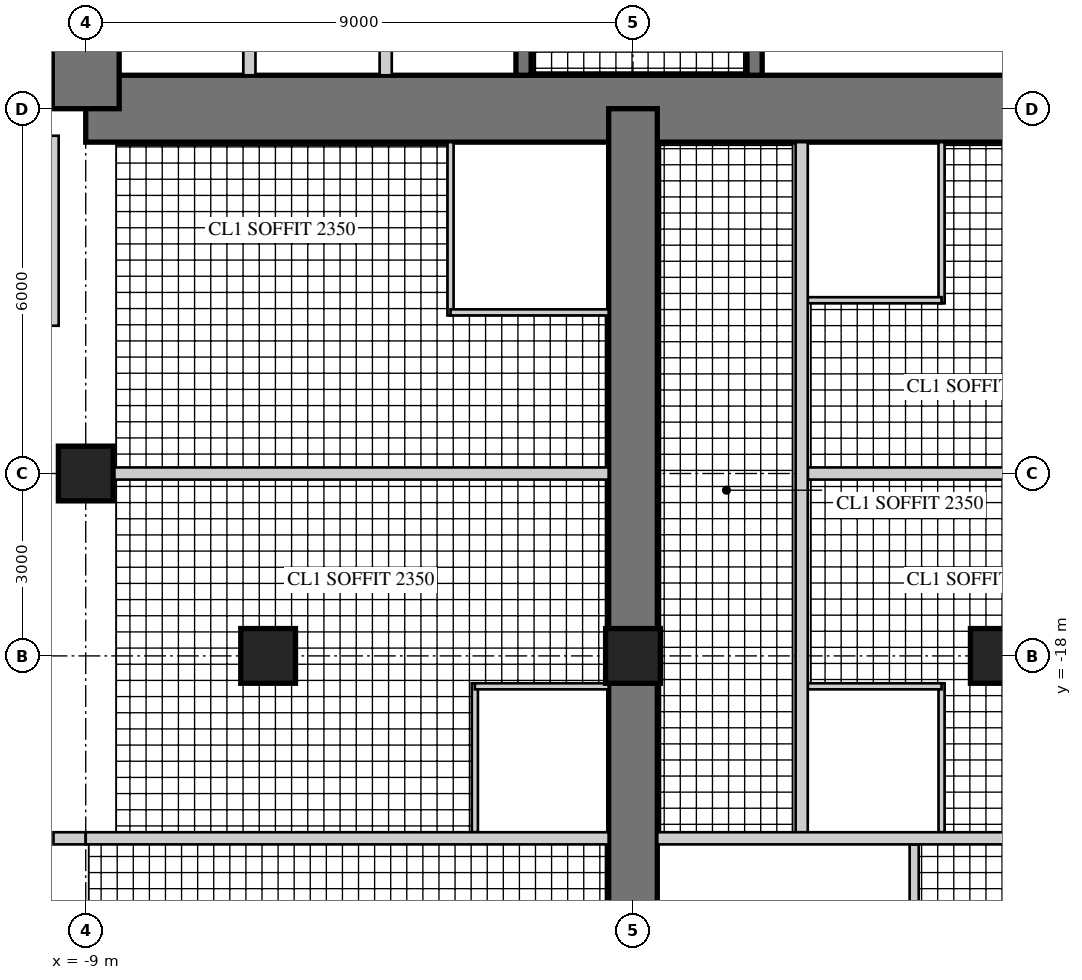
"""IFC4 building model, lengths in metres.
Left out: names, types, materials, properties, quantities, classifications, styles, units other than length and angle.
Written with IfcOpenShell. Run it as: python <this file> out.ifc"""

import sys

from ifc_helpers import new_model, si_unit, direction, frame, frame_2d, origin, origin_2d, place, context, subcontext, project, spatial, rectangle, hollow_rectangle, extrude, element, fill, save


model = new_model("IFC4")
c1 = context("Model", 3, precision=1e-05, world=origin(), true_north=direction((0.0, 1.0)))
c2 = subcontext(c1, "Body", "Model", "MODEL_VIEW")
j1 = project(units=[si_unit("LENGTHUNIT", "METRE"), si_unit("PLANEANGLEUNIT", "RADIAN")], contexts=[c1])
p1 = place(None, origin())
s1 = spatial("IfcSite", under=j1, at=p1, CompositionType="ELEMENT")
p2 = place(p1, origin())
s2 = spatial("IfcBuilding", under=s1, at=p2, CompositionType="ELEMENT")
p3 = place(p2, frame((0.0, 0.0, 172.9)))
s3 = spatial("IfcBuildingStorey", under=s2, at=p3, CompositionType="ELEMENT", Elevation=172.9)
p4 = place(p3, frame((-9.0, -9.0, 0.0), z_axis=(0.0, 0.0, 1.0), x_axis=(1.0, 0.0, 0.0)))
e1 = element("IfcWall", 1, at=p4, inside=s3, PredefinedType="SHEAR", context=c2, shape_type="SweptSolid", body=[
    extrude(rectangle(XDim=18.0, YDim=1.1, at=frame_2d((9.0, 0.0))), origin(), (0.0, 0.0, 1.0), 3.4),
])
p5 = place(p4, frame((9.8, 0.0, 0.0)))
e2 = element("IfcOpeningElement", 2, at=p5, cuts=e1, PredefinedType="OPENING", context=c2, shape_type="SweptSolid", body=[
    extrude(rectangle(XDim=1.0, YDim=2.4, at=frame_2d((0.5, 1.2))), frame((0.0, 0.56, 0.0), z_axis=(0.0, -1.0, 0.0), x_axis=(1.0, 0.0, 0.0)), (0.0, 0.0, 1.0), 1.12),
])
p6 = place(p3, frame((-9.0, 9.0, 0.0), z_axis=(0.0, 0.0, 1.0), x_axis=(0.0, -1.0, 0.0)))
e3 = element("IfcWall", 3, at=p6, inside=s3, PredefinedType="SHEAR", context=c2, shape_type="SweptSolid", body=[
    extrude(rectangle(XDim=18.0, YDim=1.1, at=frame_2d((9.0, 0.0))), origin(), (0.0, 0.0, 1.0), 3.4),
])
p7 = place(p6, frame((9.8, 0.0, 0.0)))
e4 = element("IfcOpeningElement", 4, at=p7, cuts=e3, PredefinedType="OPENING", context=c2, shape_type="SweptSolid", body=[
    extrude(rectangle(XDim=1.0, YDim=2.4, at=frame_2d((0.5, 1.2))), frame((0.0, 0.56, 0.0), z_axis=(0.0, -1.0, 0.0), x_axis=(1.0, 0.0, 0.0)), (0.0, 0.0, 1.0), 1.12),
])
p8 = place(p3, frame((-1.8, -1.875, 0.0), z_axis=(0.0, 0.0, 1.0), x_axis=(0.0, -1.0, 0.0)))
e5 = element("IfcWall", 5, at=p8, inside=s3, PredefinedType="SHEAR", context=c2, shape_type="SweptSolid", body=[
    extrude(rectangle(XDim=6.575, YDim=0.25, at=frame_2d((3.288, 0.0))), origin(), (0.0, 0.0, 1.0), 3.4),
])
p9 = place(p8, frame((1.875, 0.0, 0.0)))
e6 = element("IfcOpeningElement", 6, at=p9, cuts=e5, PredefinedType="OPENING", context=c2, shape_type="SweptSolid", body=[
    extrude(rectangle(XDim=1.6, YDim=2.4, at=frame_2d((0.8, 1.2))), frame((0.0, 0.135, 0.0), z_axis=(0.0, -1.0, 0.0), x_axis=(1.0, 0.0, 0.0)), (0.0, 0.0, 1.0), 0.27),
])
for number, where, z_axis, x_axis in (
    (7, (-4.067, -5.975, 0.0), (0.0, 0.0, 1.0), (0.0, -1.0, 0.0)),
    (8, (-6.308, -5.975, 0.0), (0.0, 0.0, 1.0), (0.0, -1.0, 0.0)),
):
    element("IfcWall", number, at=place(p3, frame(where, z_axis=z_axis, x_axis=x_axis)), inside=s3, PredefinedType="PARTITIONING", context=c2, shape_type="SweptSolid", body=[
        extrude(rectangle(XDim=2.475, YDim=0.2, at=frame_2d((1.237, 0.0))), origin(), (0.0, 0.0, 1.0), 3.4),
    ])
p10 = place(p3, frame((2.0, -1.675, 0.0), z_axis=(0.0, 0.0, 1.0), x_axis=(0.0, -1.0, 0.0)))
e9 = element("IfcWall", 9, at=p10, inside=s3, PredefinedType="SHEAR", context=c2, shape_type="SweptSolid", body=[
    extrude(rectangle(XDim=6.775, YDim=0.25, at=frame_2d((3.387, 0.0))), origin(), (0.0, 0.0, 1.0), 3.4),
])
p11 = place(p10, frame((0.725, 0.0, 0.0)))
e10 = element("IfcOpeningElement", 10, at=p11, cuts=e9, PredefinedType="OPENING", context=c2, shape_type="SweptSolid", body=[
    extrude(rectangle(XDim=1.0, YDim=2.1, at=frame_2d((0.5, 1.05))), frame((0.0, 0.135, 0.0), z_axis=(0.0, -1.0, 0.0), x_axis=(1.0, 0.0, 0.0)), (0.0, 0.0, 1.0), 0.27),
])
p12 = place(p3, frame((0.0, -9.0, 0.0), z_axis=(0.0, 0.0, 1.0), x_axis=(0.0, -1.0, 0.0)))
e11 = element("IfcWall", 11, at=p12, inside=s3, PredefinedType="SHEAR", context=c2, shape_type="SweptSolid", body=[
    extrude(rectangle(XDim=18.0, YDim=0.8, at=frame_2d((9.0, 0.0))), origin(), (0.0, 0.0, 1.0), 3.4),
])
p13 = place(p12, frame((3.95, 0.0, 0.0)))
e12 = element("IfcOpeningElement", 12, at=p13, cuts=e11, PredefinedType="OPENING", context=c2, shape_type="SweptSolid", body=[
    extrude(rectangle(XDim=1.0, YDim=2.15, at=frame_2d((0.5, 1.075))), frame((0.0, 0.41, 0.0), z_axis=(0.0, -1.0, 0.0), x_axis=(1.0, 0.0, 0.0)), (0.0, 0.0, 1.0), 0.82),
])
p14 = place(p12, frame((6.6, 0.0, 0.0)))
e13 = element("IfcOpeningElement", 13, at=p14, cuts=e11, PredefinedType="OPENING", context=c2, shape_type="SweptSolid", body=[
    extrude(rectangle(XDim=1.0, YDim=2.15, at=frame_2d((0.5, 1.075))), frame((0.0, 0.41, 0.0), z_axis=(0.0, -1.0, 0.0), x_axis=(1.0, 0.0, 0.0)), (0.0, 0.0, 1.0), 0.82),
])
p15 = place(p12, frame((13.25, 0.0, 0.0)))
e14 = element("IfcOpeningElement", 14, at=p15, cuts=e11, PredefinedType="OPENING", context=c2, shape_type="SweptSolid", body=[
    extrude(rectangle(XDim=1.0, YDim=2.2, at=frame_2d((0.5, 1.1))), frame((0.0, 0.41, 0.0), z_axis=(0.0, -1.0, 0.0), x_axis=(1.0, 0.0, 0.0)), (0.0, 0.0, 1.0), 0.82),
])
for number, where, z_axis, x_axis in (
    (15, (-9.0, -15.0, 0.0), (0.0, 0.0, 1.0), (1.0, 0.0, 0.0)),
    (16, (-6.0, -18.0, 0.0), (0.0, 0.0, 1.0), (1.0, 0.0, 0.0)),
    (17, (0.0, -18.0, 0.0), (0.0, 0.0, 1.0), (1.0, 0.0, 0.0)),
    (18, (6.0, -18.0, 0.0), (0.0, 0.0, 1.0), (1.0, 0.0, 0.0)),
):
    element("IfcColumn", number, at=place(p3, frame(where, z_axis=z_axis, x_axis=x_axis)), inside=s3, PredefinedType="COLUMN", context=c2, shape_type="SweptSolid", body=[
        extrude(rectangle(XDim=0.9, YDim=0.9, at=origin_2d()), origin(), (0.0, 0.0, 1.0), 3.4),
    ])
p16 = place(p3, frame((-9.57, -9.445, 0.0), z_axis=(0.0, 0.0, 1.0), x_axis=(0.0, -1.0, 0.0)))
e19 = element("IfcWall", 19, at=p16, inside=s3, PredefinedType="SOLIDWALL", context=c2, shape_type="SweptSolid", body=[
    extrude(rectangle(XDim=3.125, YDim=0.25, at=frame_2d((1.562, 0.0))), origin(), (0.0, 0.0, 1.0), 3.22),
])
p17 = place(p16, frame((0.6, 0.0, 0.0)))
e20 = element("IfcOpeningElement", 20, at=p17, cuts=e19, PredefinedType="OPENING", context=c2, shape_type="SweptSolid", body=[
    extrude(rectangle(XDim=1.0, YDim=2.2, at=frame_2d((0.5, 1.1))), frame((0.0, 0.135, 0.0), z_axis=(0.0, -1.0, 0.0), x_axis=(1.0, 0.0, 0.0)), (0.0, 0.0, 1.0), 0.27),
])
p18 = place(p3, frame((5.075, -9.55, 0.0), z_axis=(0.0, 0.0, 1.0), x_axis=(0.0, -1.0, 0.0)))
e21 = element("IfcWall", 21, at=p18, inside=s3, PredefinedType="PARTITIONING", context=c2, shape_type="SweptSolid", body=[
    extrude(rectangle(XDim=2.65, YDim=0.1, at=frame_2d((1.325, 0.0))), origin(), (0.0, 0.0, 1.0), 3.22),
])
p19 = place(p3, frame((2.875, -12.15, 0.0), z_axis=(0.0, 0.0, 1.0), x_axis=(1.0, 0.0, 0.0)))
e22 = element("IfcWall", 22, at=p19, inside=s3, PredefinedType="PARTITIONING", context=c2, shape_type="SweptSolid", body=[
    extrude(rectangle(XDim=2.2, YDim=0.1, at=frame_2d((1.1, 0.0))), origin(), (0.0, 0.0, 1.0), 3.22),
])
p20 = place(p19, frame((0.55, 0.0, 0.0)))
e23 = element("IfcOpeningElement", 23, at=p20, cuts=e22, PredefinedType="OPENING", context=c2, shape_type="SweptSolid", body=[
    extrude(rectangle(XDim=0.9, YDim=2.1, at=frame_2d((0.45, 1.05))), frame((0.0, 0.06, 0.0), z_axis=(0.0, -1.0, 0.0), x_axis=(1.0, 0.0, 0.0)), (0.0, 0.0, 1.0), 0.12),
])
p21 = place(p3, frame((-3.0, -9.55, 0.0), z_axis=(0.0, 0.0, 1.0), x_axis=(0.0, -1.0, 0.0)))
e24 = element("IfcWall", 24, at=p21, inside=s3, PredefinedType="PARTITIONING", context=c2, shape_type="SweptSolid", body=[
    extrude(rectangle(XDim=2.85, YDim=0.1, at=frame_2d((1.425, 0.0))), origin(), (0.0, 0.0, 1.0), 3.22),
])
p22 = place(p3, frame((-3.0, -12.35, 0.0), z_axis=(0.0, 0.0, 1.0), x_axis=(1.0, 0.0, 0.0)))
e25 = element("IfcWall", 25, at=p22, inside=s3, PredefinedType="PARTITIONING", context=c2, shape_type="SweptSolid", body=[
    extrude(rectangle(XDim=2.6, YDim=0.1, at=frame_2d((1.3, 0.0))), origin(), (0.0, 0.0, 1.0), 3.22),
])
p23 = place(p22, frame((0.55, 0.0, 0.0)))
e26 = element("IfcOpeningElement", 26, at=p23, cuts=e25, PredefinedType="OPENING", context=c2, shape_type="SweptSolid", body=[
    extrude(rectangle(XDim=0.9, YDim=2.1, at=frame_2d((0.45, 1.05))), frame((0.0, 0.06, 0.0), z_axis=(0.0, -1.0, 0.0), x_axis=(1.0, 0.0, 0.0)), (0.0, 0.0, 1.0), 0.12),
])
p24 = place(p3, frame((2.875, -15.0, 0.0), z_axis=(0.0, 0.0, 1.0), x_axis=(1.0, 0.0, 0.0)))
e27 = element("IfcWall", 27, at=p24, inside=s3, PredefinedType="SOLIDWALL", context=c2, shape_type="SweptSolid", body=[
    extrude(rectangle(XDim=5.675, YDim=0.2, at=frame_2d((2.837, 0.0))), origin(), (0.0, 0.0, 1.0), 2.47),
])
p25 = place(p3, frame((-8.55, -15.0, 0.0), z_axis=(0.0, 0.0, 1.0), x_axis=(1.0, 0.0, 0.0)))
e28 = element("IfcWall", 28, at=p25, inside=s3, PredefinedType="SOLIDWALL", context=c2, shape_type="SweptSolid", body=[
    extrude(rectangle(XDim=8.15, YDim=0.2, at=frame_2d((4.075, 0.0))), origin(), (0.0, 0.0, 1.0), 2.47),
])
p26 = place(p3, frame((5.075, -18.45, 0.0), z_axis=(0.0, 0.0, 1.0), x_axis=(0.0, -1.0, 0.0)))
e29 = element("IfcWall", 29, at=p26, inside=s3, PredefinedType="PARTITIONING", context=c2, shape_type="SweptSolid", body=[
    extrude(rectangle(XDim=2.45, YDim=0.1, at=frame_2d((1.225, 0.0))), origin(), (0.0, 0.0, 1.0), 3.22),
])
p27 = place(p3, frame((2.875, -18.5, 0.0), z_axis=(0.0, 0.0, 1.0), x_axis=(1.0, 0.0, 0.0)))
e30 = element("IfcWall", 30, at=p27, inside=s3, PredefinedType="PARTITIONING", context=c2, shape_type="SweptSolid", body=[
    extrude(rectangle(XDim=2.2, YDim=0.1, at=frame_2d((1.1, 0.0))), origin(), (0.0, 0.0, 1.0), 3.22),
])
p28 = place(p27, frame((0.55, 0.0, 0.0)))
e31 = element("IfcOpeningElement", 31, at=p28, cuts=e30, PredefinedType="OPENING", context=c2, shape_type="SweptSolid", body=[
    extrude(rectangle(XDim=0.9, YDim=2.1, at=frame_2d((0.45, 1.05))), frame((0.0, 0.06, 0.0), z_axis=(0.0, -1.0, 0.0), x_axis=(1.0, 0.0, 0.0)), (0.0, 0.0, 1.0), 0.12),
])
p29 = place(p3, frame((-2.6, -18.45, 0.0), z_axis=(0.0, 0.0, 1.0), x_axis=(0.0, -1.0, 0.0)))
e32 = element("IfcWall", 32, at=p29, inside=s3, PredefinedType="PARTITIONING", context=c2, shape_type="SweptSolid", body=[
    extrude(rectangle(XDim=2.45, YDim=0.1, at=frame_2d((1.225, 0.0))), origin(), (0.0, 0.0, 1.0), 3.22),
])
p30 = place(p3, frame((-2.6, -18.5, 0.0), z_axis=(0.0, 0.0, 1.0), x_axis=(1.0, 0.0, 0.0)))
e33 = element("IfcWall", 33, at=p30, inside=s3, PredefinedType="PARTITIONING", context=c2, shape_type="SweptSolid", body=[
    extrude(rectangle(XDim=2.2, YDim=0.1, at=frame_2d((1.1, 0.0))), origin(), (0.0, 0.0, 1.0), 3.22),
])
p31 = place(p30, frame((0.55, 0.0, 0.0)))
e34 = element("IfcOpeningElement", 34, at=p31, cuts=e33, PredefinedType="OPENING", context=c2, shape_type="SweptSolid", body=[
    extrude(rectangle(XDim=0.9, YDim=2.1, at=frame_2d((0.45, 1.05))), frame((0.0, 0.06, 0.0), z_axis=(0.0, -1.0, 0.0), x_axis=(1.0, 0.0, 0.0)), (0.0, 0.0, 1.0), 0.12),
])
p32 = place(p3, frame((2.775, -9.55, 0.0), z_axis=(0.0, 0.0, 1.0), x_axis=(0.0, -1.0, 0.0)))
e35 = element("IfcWall", 35, at=p32, inside=s3, PredefinedType="SOLIDWALL", context=c2, shape_type="SweptSolid", body=[
    extrude(rectangle(XDim=11.45, YDim=0.2, at=frame_2d((5.725, 0.0))), origin(), (0.0, 0.0, 1.0), 3.22),
])
p33 = place(p32, frame((3.4, 0.0, 0.0)))
e36 = element("IfcOpeningElement", 36, at=p33, cuts=e35, PredefinedType="OPENING", context=c2, shape_type="SweptSolid", body=[
    extrude(rectangle(XDim=1.0, YDim=2.15, at=frame_2d((0.5, 1.075))), frame((0.0, 0.11, 0.0), z_axis=(0.0, -1.0, 0.0), x_axis=(1.0, 0.0, 0.0)), (0.0, 0.0, 1.0), 0.22),
])
p34 = place(p32, frame((6.05, 0.0, 0.0)))
e37 = element("IfcOpeningElement", 37, at=p34, cuts=e35, PredefinedType="OPENING", context=c2, shape_type="SweptSolid", body=[
    extrude(rectangle(XDim=1.0, YDim=2.15, at=frame_2d((0.5, 1.075))), frame((0.0, 0.11, 0.0), z_axis=(0.0, -1.0, 0.0), x_axis=(1.0, 0.0, 0.0)), (0.0, 0.0, 1.0), 0.22),
])
p35 = place(p3, frame((4.625, -21.1, 0.0), z_axis=(0.0, 0.0, 1.0), x_axis=(0.0, -1.0, 0.0)))
e38 = element("IfcWall", 38, at=p35, inside=s3, PredefinedType="PARTITIONING", context=c2, shape_type="SweptSolid", body=[
    extrude(rectangle(XDim=5.5, YDim=0.15, at=frame_2d((2.75, 0.0))), origin(), (0.0, 0.0, 1.0), 3.22),
])
p36 = place(p35, frame((0.6, 0.0, 0.0)))
e39 = element("IfcOpeningElement", 39, at=p36, cuts=e38, PredefinedType="OPENING", context=c2, shape_type="SweptSolid", body=[
    extrude(rectangle(XDim=1.0, YDim=2.1, at=frame_2d((0.5, 1.05))), frame((0.0, 0.085, 0.0), z_axis=(0.0, -1.0, 0.0), x_axis=(1.0, 0.0, 0.0)), (0.0, 0.0, 1.0), 0.17),
])
p37 = place(p3, frame((-9.53, -21.0, 0.0), z_axis=(0.0, 0.0, 1.0), x_axis=(1.0, 0.0, 0.0)))
e40 = element("IfcWall", 40, at=p37, inside=s3, PredefinedType="SOLIDWALL", context=c2, shape_type="SweptSolid", body=[
    extrude(rectangle(XDim=0.53, YDim=0.2, at=frame_2d((0.265, 0.0))), origin(), (0.0, 0.0, 1.0), 3.22),
])
p38 = place(p3, frame((-9.0, -21.0, 0.0), z_axis=(0.0, 0.0, 1.0), x_axis=(1.0, 0.0, 0.0)))
e41 = element("IfcWall", 41, at=p38, inside=s3, PredefinedType="SOLIDWALL", context=c2, shape_type="SweptSolid", body=[
    extrude(rectangle(XDim=8.6, YDim=0.2, at=frame_2d((4.3, 0.0))), origin(), (0.0, 0.0, 1.0), 2.62),
])
p39 = place(p3, frame((0.4, -21.0, 0.0), z_axis=(0.0, 0.0, 1.0), x_axis=(1.0, 0.0, 0.0)))
e42 = element("IfcWall", 42, at=p39, inside=s3, PredefinedType="SOLIDWALL", context=c2, shape_type="SweptSolid", body=[
    extrude(rectangle(XDim=8.6, YDim=0.2, at=frame_2d((4.3, 0.0))), origin(), (0.0, 0.0, 1.0), 2.62),
])
p40 = place(p39, frame((0.4, 0.0, 0.0)))
e43 = element("IfcOpeningElement", 43, at=p40, cuts=e42, PredefinedType="OPENING", context=c2, shape_type="SweptSolid", body=[
    extrude(rectangle(XDim=1.0, YDim=2.2, at=frame_2d((0.5, 1.1))), frame((0.0, 0.11, 0.0), z_axis=(0.0, -1.0, 0.0), x_axis=(1.0, 0.0, 0.0)), (0.0, 0.0, 1.0), 0.22),
])
p41 = place(p17, origin())
e44 = element("IfcDoor", 44, at=p41, inside=s3, OperationType="SINGLE_SWING_LEFT", PredefinedType="DOOR", context=c2, shape_type="SweptSolid", body=[
    extrude(hollow_rectangle(XDim=1.0, YDim=2.2, WallThickness=0.06, at=frame_2d((0.5, 1.1))), frame((0.0, 0.025, 0.0), z_axis=(0.0, -1.0, 0.0), x_axis=(1.0, 0.0, 0.0)), (0.0, 0.0, 1.0), 0.05),
    extrude(rectangle(XDim=0.879, YDim=2.079, at=frame_2d((0.5, 1.1))), frame((0.0, 0.025, 0.0), z_axis=(0.0, -1.0, 0.0), x_axis=(1.0, 0.0, 0.0)), (0.0, 0.0, 1.0), 0.05),
])
fill(e20, e44)
p42 = place(p20, origin())
e45 = element("IfcDoor", 45, at=p42, inside=s3, OperationType="SINGLE_SWING_LEFT", PredefinedType="DOOR", context=c2, shape_type="SweptSolid", body=[
    extrude(rectangle(XDim=0.9, YDim=2.1, at=frame_2d((0.45, 1.05))), frame((0.0, 0.025, 0.0), z_axis=(0.0, -1.0, 0.0), x_axis=(1.0, 0.0, 0.0)), (0.0, 0.0, 1.0), 0.05),
])
fill(e23, e45)
p43 = place(p23, origin())
e46 = element("IfcDoor", 46, at=p43, inside=s3, OperationType="SINGLE_SWING_LEFT", PredefinedType="DOOR", context=c2, shape_type="SweptSolid", body=[
    extrude(rectangle(XDim=0.9, YDim=2.1, at=frame_2d((0.45, 1.05))), frame((0.0, 0.025, 0.0), z_axis=(0.0, -1.0, 0.0), x_axis=(1.0, 0.0, 0.0)), (0.0, 0.0, 1.0), 0.05),
])
fill(e26, e46)
p44 = place(p28, frame((0.9, 0.0, 0.0), z_axis=(0.0, 0.0, 1.0), x_axis=(-1.0, 0.0, 0.0)))
e47 = element("IfcDoor", 47, at=p44, inside=s3, OperationType="SINGLE_SWING_RIGHT", PredefinedType="DOOR", context=c2, shape_type="SweptSolid", body=[
    extrude(rectangle(XDim=0.9, YDim=2.1, at=frame_2d((0.45, 1.05))), frame((0.0, 0.025, 0.0), z_axis=(0.0, -1.0, 0.0), x_axis=(1.0, 0.0, 0.0)), (0.0, 0.0, 1.0), 0.05),
])
fill(e31, e47)
p45 = place(p31, frame((0.9, 0.0, 0.0), z_axis=(0.0, 0.0, 1.0), x_axis=(-1.0, 0.0, 0.0)))
e48 = element("IfcDoor", 48, at=p45, inside=s3, OperationType="SINGLE_SWING_RIGHT", PredefinedType="DOOR", context=c2, shape_type="SweptSolid", body=[
    extrude(rectangle(XDim=0.9, YDim=2.1, at=frame_2d((0.45, 1.05))), frame((0.0, 0.025, 0.0), z_axis=(0.0, -1.0, 0.0), x_axis=(1.0, 0.0, 0.0)), (0.0, 0.0, 1.0), 0.05),
])
fill(e34, e48)
p46 = place(p33, origin())
e49 = element("IfcDoor", 49, at=p46, inside=s3, OperationType="SINGLE_SWING_LEFT", PredefinedType="DOOR", context=c2, shape_type="SweptSolid", body=[
    extrude(rectangle(XDim=1.0, YDim=2.15, at=frame_2d((0.5, 1.075))), frame((0.0, 0.025, 0.0), z_axis=(0.0, -1.0, 0.0), x_axis=(1.0, 0.0, 0.0)), (0.0, 0.0, 1.0), 0.05),
])
fill(e36, e49)
p47 = place(p34, origin())
e50 = element("IfcDoor", 50, at=p47, inside=s3, OperationType="SINGLE_SWING_LEFT", PredefinedType="DOOR", context=c2, shape_type="SweptSolid", body=[
    extrude(rectangle(XDim=1.0, YDim=2.15, at=frame_2d((0.5, 1.075))), frame((0.0, 0.025, 0.0), z_axis=(0.0, -1.0, 0.0), x_axis=(1.0, 0.0, 0.0)), (0.0, 0.0, 1.0), 0.05),
])
fill(e37, e50)
p48 = place(p36, origin())
e51 = element("IfcDoor", 51, at=p48, inside=s3, OperationType="SINGLE_SWING_LEFT", PredefinedType="DOOR", context=c2, shape_type="SweptSolid", body=[
    extrude(rectangle(XDim=1.0, YDim=2.1, at=frame_2d((0.5, 1.05))), frame((0.0, 0.025, 0.0), z_axis=(0.0, -1.0, 0.0), x_axis=(1.0, 0.0, 0.0)), (0.0, 0.0, 1.0), 0.05),
])
fill(e39, e51)
p49 = place(p40, frame((1.0, 0.0, 0.0), z_axis=(0.0, 0.0, 1.0), x_axis=(-1.0, 0.0, 0.0)))
e52 = element("IfcDoor", 52, at=p49, inside=s3, OperationType="SINGLE_SWING_RIGHT", PredefinedType="DOOR", context=c2, shape_type="SweptSolid", body=[
    extrude(rectangle(XDim=1.0, YDim=2.2, at=frame_2d((0.5, 1.1))), frame((0.0, 0.025, 0.0), z_axis=(0.0, -1.0, 0.0), x_axis=(1.0, 0.0, 0.0)), (0.0, 0.0, 1.0), 0.05),
])
fill(e43, e52)
p50 = place(p13, frame((1.0, 0.0, 0.0), z_axis=(0.0, 0.0, 1.0), x_axis=(-1.0, 0.0, 0.0)))
e53 = element("IfcDoor", 53, at=p50, inside=s3, OperationType="SINGLE_SWING_RIGHT", PredefinedType="DOOR", context=c2, shape_type="SweptSolid", body=[
    extrude(rectangle(XDim=1.0, YDim=2.15, at=frame_2d((0.5, 1.075))), frame((0.0, 0.025, 0.0), z_axis=(0.0, -1.0, 0.0), x_axis=(1.0, 0.0, 0.0)), (0.0, 0.0, 1.0), 0.05),
])
fill(e12, e53)
p51 = place(p14, frame((1.0, 0.0, 0.0), z_axis=(0.0, 0.0, 1.0), x_axis=(-1.0, 0.0, 0.0)))
e54 = element("IfcDoor", 54, at=p51, inside=s3, OperationType="SINGLE_SWING_RIGHT", PredefinedType="DOOR", context=c2, shape_type="SweptSolid", body=[
    extrude(rectangle(XDim=1.0, YDim=2.15, at=frame_2d((0.5, 1.075))), frame((0.0, 0.025, 0.0), z_axis=(0.0, -1.0, 0.0), x_axis=(1.0, 0.0, 0.0)), (0.0, 0.0, 1.0), 0.05),
])
fill(e13, e54)
p52 = place(p5, origin())
e55 = element("IfcDoor", 55, at=p52, inside=s3, OperationType="SINGLE_SWING_RIGHT", PredefinedType="DOOR", context=c2, shape_type="SweptSolid", body=[
    extrude(rectangle(XDim=1.0, YDim=2.4, at=frame_2d((0.5, 1.2))), frame((0.0, 0.055, 0.0), z_axis=(0.0, -1.0, 0.0), x_axis=(1.0, 0.0, 0.0)), (0.0, 0.0, 1.0), 0.05),
])
fill(e2, e55)
save(model, sys.argv[1])
